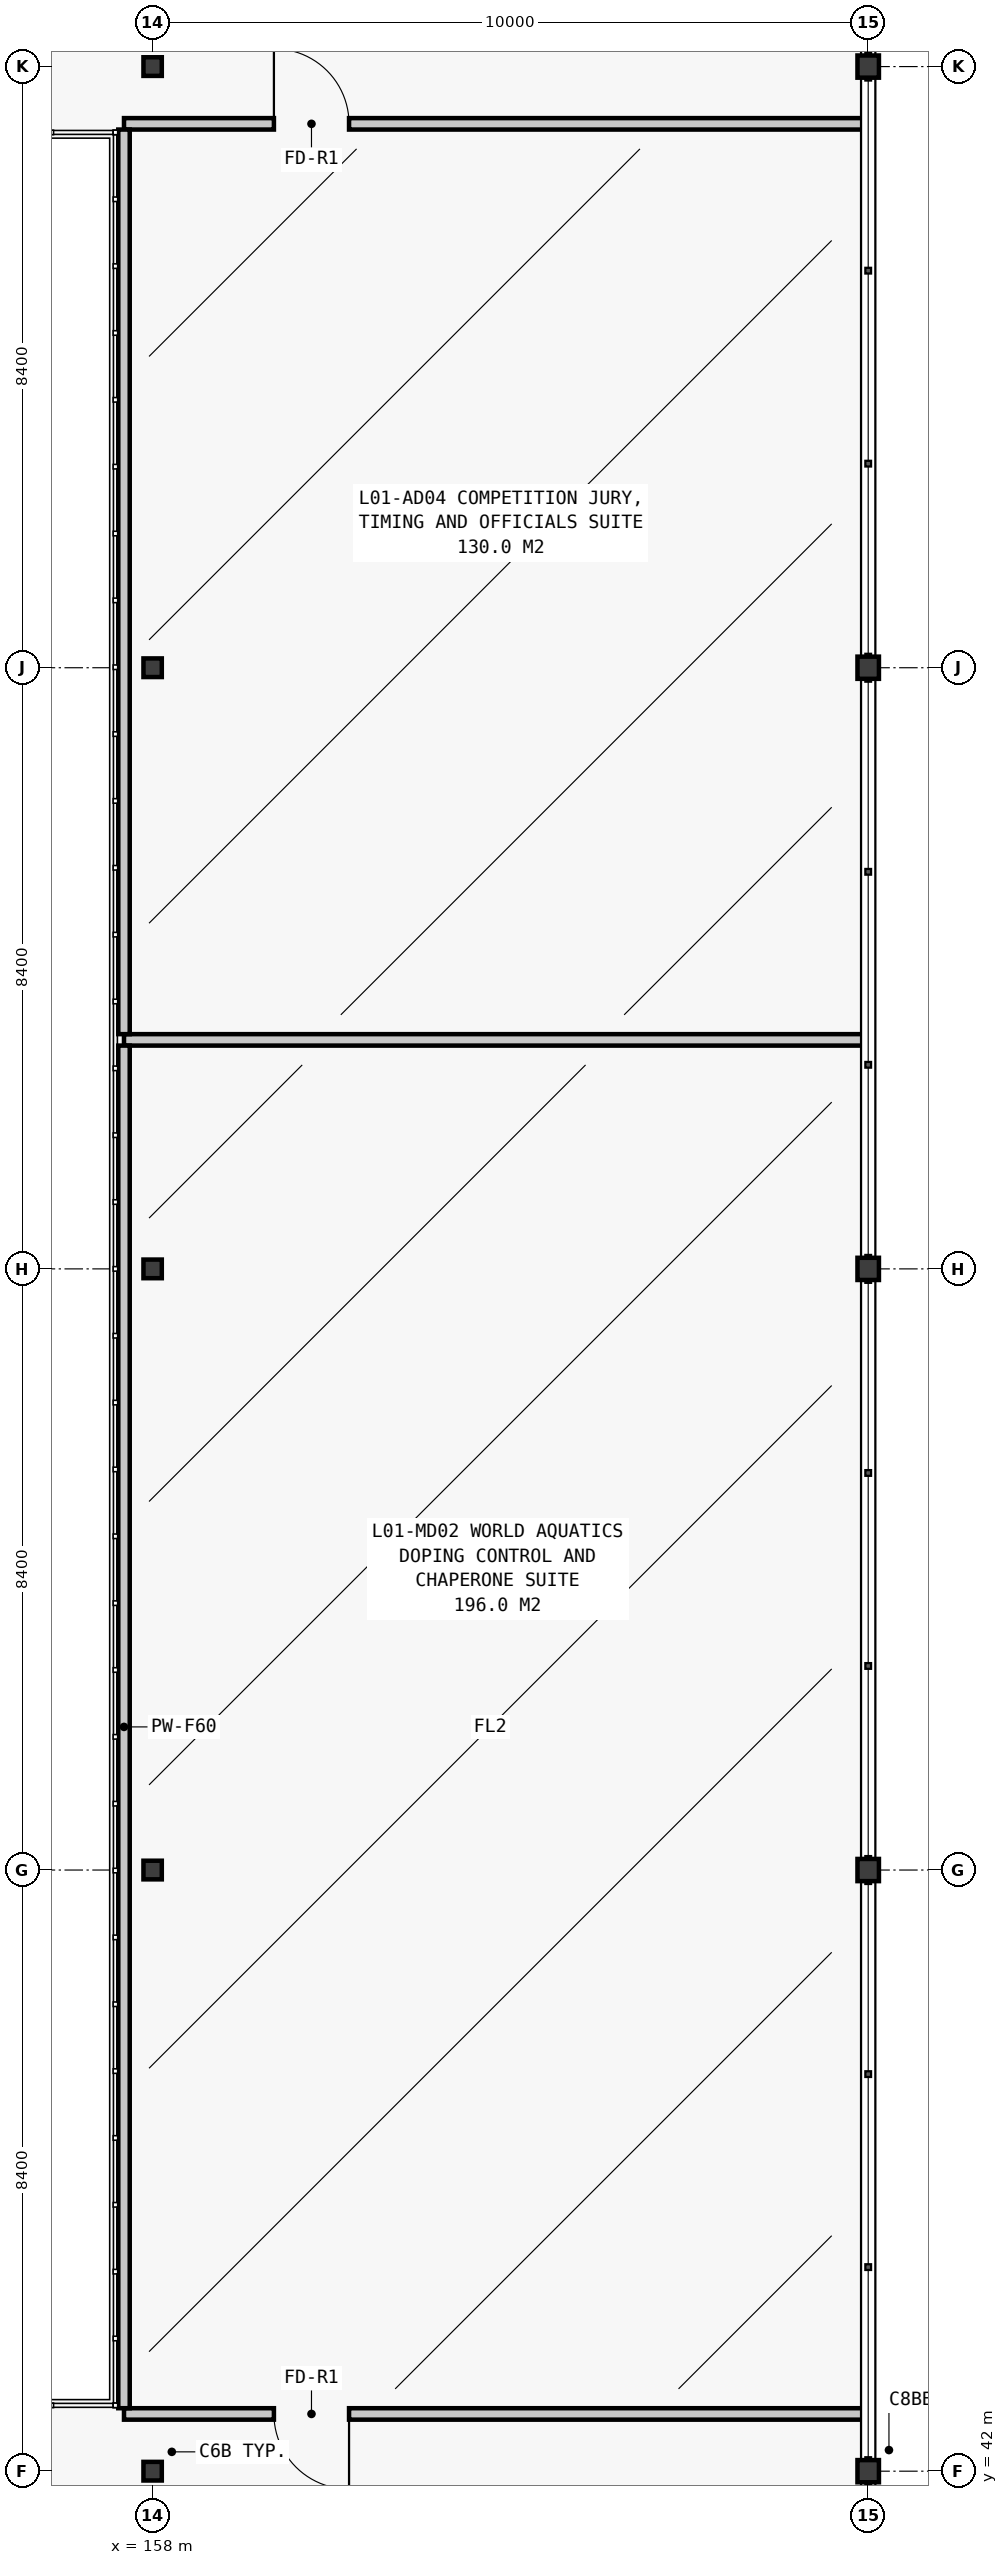
"""IFC4 building model, lengths in metres.
Left out: names, types, materials, properties, quantities, classifications, styles, units other than length and angle.
Written with IfcOpenShell. Run it as: python <this file> out.ifc"""

import sys

from ifc_helpers import new_model, si_unit, direction, frame, frame_2d, origin, origin_2d, place, context, subcontext, project, spatial, rectangle, i_section, extrude, element, fill, save


model = new_model("IFC4")
c1 = context("Model", 3, precision=1e-05, world=origin(), true_north=direction((0.0, 1.0)))
c2 = subcontext(c1, "Body", "Model", "MODEL_VIEW")
j1 = project(units=[si_unit("LENGTHUNIT", "METRE"), si_unit("PLANEANGLEUNIT", "RADIAN")], contexts=[c1])
p1 = place(None, origin())
s1 = spatial("IfcSite", under=j1, at=p1, CompositionType="ELEMENT")
p2 = place(p1, origin())
s2 = spatial("IfcBuilding", under=s1, at=p2, CompositionType="ELEMENT")
p3 = place(p2, frame((0.0, 0.0, 4.8)))
s3 = spatial("IfcBuildingStorey", under=s2, at=p3, CompositionType="ELEMENT", Elevation=4.8)
for number, where, z_axis, x_axis in (
    (1, (158.0, 42.0, 0.0), (0.0, 0.0, 1.0), (1.0, 0.0, 0.0)),
    (2, (158.0, 50.4, 0.0), (0.0, 0.0, 1.0), (1.0, 0.0, 0.0)),
    (3, (158.0, 58.8, 0.0), (0.0, 0.0, 1.0), (1.0, 0.0, 0.0)),
    (4, (158.0, 67.2, 0.0), (0.0, 0.0, 1.0), (1.0, 0.0, 0.0)),
    (5, (158.0, 75.6, 0.0), (0.0, 0.0, 1.0), (1.0, 0.0, 0.0)),
):
    element("IfcColumn", number, at=place(p3, frame(where, z_axis=z_axis, x_axis=x_axis)), inside=s3, PredefinedType="COLUMN", context=c2, shape_type="SweptSolid", body=[
        extrude(i_section(OverallWidth=0.256, OverallDepth=0.26, WebThickness=0.01, FlangeThickness=0.017, FilletRadius=0.013, at=origin_2d()), origin(), (0.0, 0.0, 1.0), 4.2),
    ])
for number, where, z_axis, x_axis in (
    (6, (168.0, 42.0, 0.0), (0.0, 0.0, 1.0), (1.0, 0.0, 0.0)),
    (7, (168.0, 50.4, 0.0), (0.0, 0.0, 1.0), (1.0, 0.0, 0.0)),
    (8, (168.0, 58.8, 0.0), (0.0, 0.0, 1.0), (1.0, 0.0, 0.0)),
    (9, (168.0, 67.2, 0.0), (0.0, 0.0, 1.0), (1.0, 0.0, 0.0)),
    (10, (168.0, 75.6, 0.0), (0.0, 0.0, 1.0), (1.0, 0.0, 0.0)),
):
    element("IfcColumn", number, at=place(p3, frame(where, z_axis=z_axis, x_axis=x_axis)), inside=s3, PredefinedType="COLUMN", context=c2, shape_type="SweptSolid", body=[
        extrude(i_section(OverallWidth=0.3, OverallDepth=0.31, WebThickness=0.009, FlangeThickness=0.015, FilletRadius=0.027, at=origin_2d()), origin(), (0.0, 0.0, 1.0), 4.2),
    ])
p4 = place(p3, frame((157.6, 42.8, 0.0), z_axis=(0.0, 0.0, 1.0), x_axis=(1.0, 0.0, 0.0)))
e11 = element("IfcWall", 11, at=p4, inside=s3, PredefinedType="PARTITIONING", context=c2, shape_type="SweptSolid", body=[
    extrude(rectangle(XDim=10.38, YDim=0.16, at=frame_2d((5.19, 0.0))), origin(), (0.0, 0.0, 1.0), 3.94),
])
p5 = place(p4, frame((2.095, 0.0, 0.0)))
e12 = element("IfcOpeningElement", 12, at=p5, cuts=e11, PredefinedType="OPENING", context=c2, shape_type="SweptSolid", body=[
    extrude(rectangle(XDim=1.05, YDim=2.18, at=frame_2d((0.525, 1.09))), frame((0.0, 0.095, 0.0), z_axis=(0.0, -1.0, 0.0), x_axis=(1.0, 0.0, 0.0)), (0.0, 0.0, 1.0), 0.19),
])
p6 = place(p3, frame((157.6, 62.0, 0.0), z_axis=(0.0, 0.0, 1.0), x_axis=(1.0, 0.0, 0.0)))
e13 = element("IfcWall", 13, at=p6, inside=s3, PredefinedType="PARTITIONING", context=c2, shape_type="SweptSolid", body=[
    extrude(rectangle(XDim=10.38, YDim=0.16, at=frame_2d((5.19, 0.0))), origin(), (0.0, 0.0, 1.0), 3.94),
])
p7 = place(p3, frame((157.6, 42.88, 0.0), z_axis=(0.0, 0.0, 1.0), x_axis=(0.0, 1.0, 0.0)))
e14 = element("IfcWall", 14, at=p7, inside=s3, PredefinedType="PARTITIONING", context=c2, shape_type="SweptSolid", body=[
    extrude(rectangle(XDim=19.04, YDim=0.16, at=frame_2d((9.52, 0.0))), origin(), (0.0, 0.0, 1.0), 3.94),
])
p8 = place(p3, frame((157.6, 74.8, 0.0), z_axis=(0.0, 0.0, 1.0), x_axis=(1.0, 0.0, 0.0)))
e15 = element("IfcWall", 15, at=p8, inside=s3, PredefinedType="PARTITIONING", context=c2, shape_type="SweptSolid", body=[
    extrude(rectangle(XDim=10.38, YDim=0.16, at=frame_2d((5.19, 0.0))), origin(), (0.0, 0.0, 1.0), 3.94),
])
p9 = place(p8, frame((2.095, 0.0, 0.0)))
e16 = element("IfcOpeningElement", 16, at=p9, cuts=e15, PredefinedType="OPENING", context=c2, shape_type="SweptSolid", body=[
    extrude(rectangle(XDim=1.05, YDim=2.18, at=frame_2d((0.525, 1.09))), frame((0.0, 0.095, 0.0), z_axis=(0.0, -1.0, 0.0), x_axis=(1.0, 0.0, 0.0)), (0.0, 0.0, 1.0), 0.19),
])
p10 = place(p3, frame((157.6, 62.08, 0.0), z_axis=(0.0, 0.0, 1.0), x_axis=(0.0, 1.0, 0.0)))
e17 = element("IfcWall", 17, at=p10, inside=s3, PredefinedType="PARTITIONING", context=c2, shape_type="SweptSolid", body=[
    extrude(rectangle(XDim=12.64, YDim=0.16, at=frame_2d((6.32, 0.0))), origin(), (0.0, 0.0, 1.0), 3.94),
])
p11 = place(p5, frame((1.05, 0.0, 0.0), z_axis=(0.0, 0.0, 1.0), x_axis=(-1.0, 0.0, 0.0)))
e18 = element("IfcDoor", 18, at=p11, inside=s3, OperationType="SINGLE_SWING_RIGHT", PredefinedType="DOOR", context=c2, shape_type="SweptSolid", body=[
    extrude(rectangle(XDim=1.05, YDim=2.18, at=frame_2d((0.525, 1.09))), frame((0.0, 0.025, 0.0), z_axis=(0.0, -1.0, 0.0), x_axis=(1.0, 0.0, 0.0)), (0.0, 0.0, 1.0), 0.05),
])
fill(e12, e18)
p12 = place(p9, origin())
e19 = element("IfcDoor", 19, at=p12, inside=s3, OperationType="SINGLE_SWING_LEFT", PredefinedType="DOOR", context=c2, shape_type="SweptSolid", body=[
    extrude(rectangle(XDim=1.05, YDim=2.18, at=frame_2d((0.525, 1.09))), frame((0.0, 0.025, 0.0), z_axis=(0.0, -1.0, 0.0), x_axis=(1.0, 0.0, 0.0)), (0.0, 0.0, 1.0), 0.05),
])
fill(e16, e19)
save(model, sys.argv[1])
